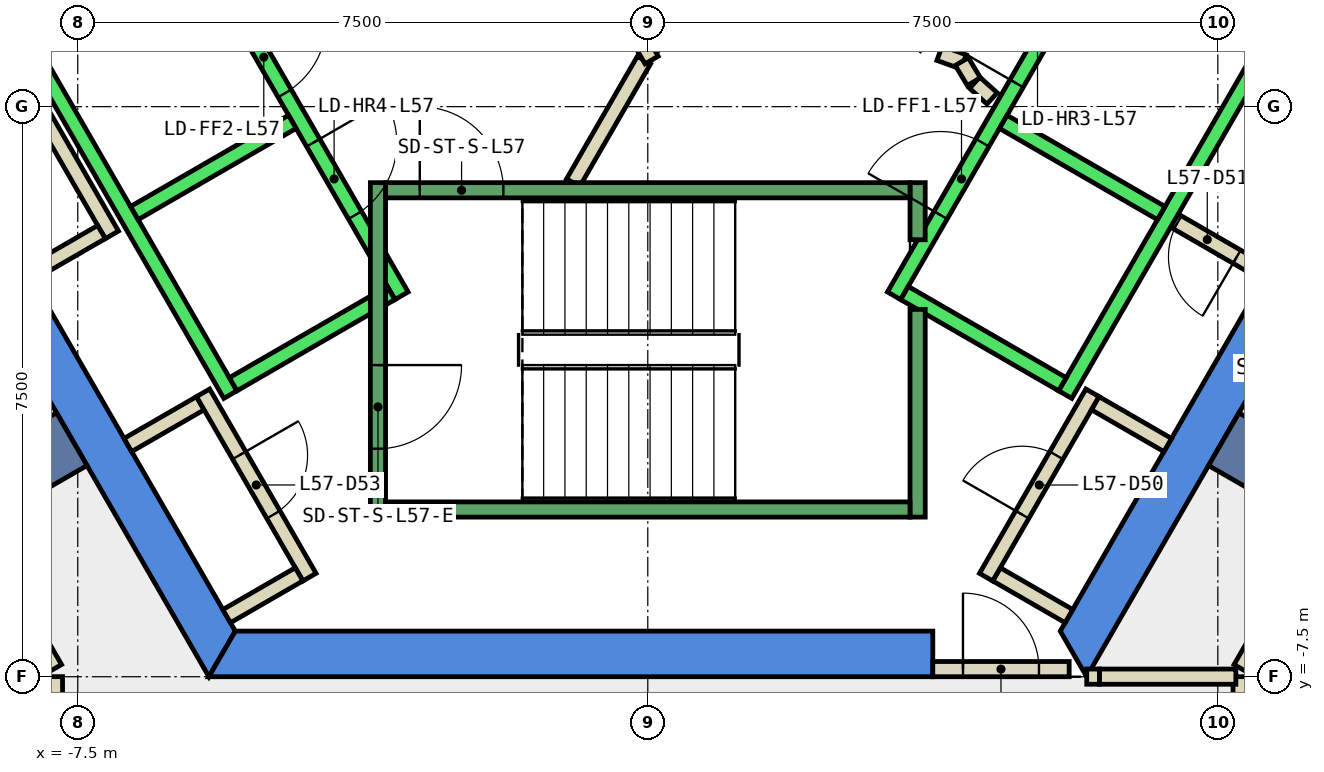
"""IFC4 building model, lengths in metres.
Left out: names, types, materials, properties, quantities, classifications, styles, units other than length and angle.
Written with IfcOpenShell. Run it as: python <this file> out.ifc"""

import sys

from ifc_helpers import new_model, si_unit, direction, frame, frame_2d, origin, place, context, subcontext, project, spatial, polyline, rectangle, outline, extrude, element, fill, save


model = new_model("IFC4")
c1 = context("Model", 3, precision=1e-05, world=origin(), true_north=direction((0.0, 1.0)))
c2 = subcontext(c1, "Body", "Model", "MODEL_VIEW")
j1 = project(units=[si_unit("LENGTHUNIT", "METRE"), si_unit("PLANEANGLEUNIT", "RADIAN")], contexts=[c1])
p1 = place(None, origin())
s1 = spatial("IfcSite", under=j1, at=p1, CompositionType="ELEMENT")
p2 = place(p1, origin())
s2 = spatial("IfcBuilding", under=s1, at=p2, CompositionType="ELEMENT")
p3 = place(p2, frame((0.0, 0.0, 252.2)))
s3 = spatial("IfcBuildingStorey", under=s2, at=p3, CompositionType="ELEMENT", Elevation=252.2)
p4 = place(p3, frame((0.0, 0.0, -0.34)))
e1 = element("IfcWall", 1, at=p4, inside=s3, PredefinedType="SHEAR", context=c2, shape_type="SweptSolid", body=[
    extrude(outline(polyline([(-11.547, 2.5), (-5.774, -7.5), (-5.427, -6.9), (-10.854, 2.5), (-11.547, 2.5)])), origin(), (0.0, 0.0, 1.0), 3.6),
])
p5 = place(p3, frame((0.0, 0.0, -0.34)))
e2 = element("IfcWall", 2, at=p5, inside=s3, PredefinedType="SHEAR", context=c2, shape_type="SweptSolid", body=[
    extrude(outline(polyline([(3.75, -7.5), (3.75, -6.9), (-5.427, -6.9), (-5.774, -7.5), (3.75, -7.5)])), origin(), (0.0, 0.0, 1.0), 3.6),
])
p6 = place(p3, frame((0.0, 0.0, -0.34)))
e3 = element("IfcWall", 3, at=p6, inside=s3, PredefinedType="SHEAR", context=c2, shape_type="SweptSolid", body=[
    extrude(outline(polyline([(5.774, -7.5), (11.547, 2.5), (10.854, 2.5), (5.427, -6.9), (5.774, -7.5)])), origin(), (0.0, 0.0, 1.0), 3.6),
])
for number, where, z_axis, x_axis in (
    (4, (7.578, -4.375, -0.34), (0.0, 0.0, 1.0), (0.866, -0.5, 0.0)),
    (5, (-7.578, -4.375, -0.34), (0.0, 0.0, 1.0), (-0.866, -0.5, 0.0)),
):
    element("IfcWall", number, at=place(p3, frame(where, z_axis=z_axis, x_axis=x_axis)), inside=s3, PredefinedType="SHEAR", context=c2, shape_type="SweptSolid", body=[
        extrude(rectangle(XDim=9.0, YDim=0.8, at=frame_2d((4.5, 0.0))), origin(), (0.0, 0.0, 1.0), 3.6),
    ])
p7 = place(p3, frame((-7.8, -7.39, 0.0), z_axis=(0.0, 0.0, 1.0), x_axis=(-0.500266477503, 0.865871498253, 0.0)))
e6 = element("IfcWall", 6, at=p7, inside=s3, PredefinedType="PARTITIONING", context=c2, shape_type="SweptSolid", body=[
    extrude(rectangle(XDim=1.463, YDim=0.2, at=frame_2d((0.731, 0.0))), origin(), (0.0, 0.0, 1.0), 3.26),
])
p8 = place(p3, frame((5.541, -6.703, 0.0), z_axis=(0.0, 0.0, 1.0), x_axis=(-0.86621513555, 0.499671230855, 0.0)))
e7 = element("IfcWall", 7, at=p8, inside=s3, PredefinedType="PARTITIONING", context=c2, shape_type="SweptSolid", body=[
    extrude(rectangle(XDim=1.1, YDim=0.2, at=frame_2d((0.55, 0.0))), origin(), (0.0, 0.0, 1.0), 3.26),
])
p9 = place(p3, frame((4.451, -6.19, 0.0), z_axis=(0.0, 0.0, 1.0), x_axis=(0.500011755427, 0.866018616679, 0.0)))
e8 = element("IfcWall", 8, at=p9, inside=s3, PredefinedType="PARTITIONING", context=c2, shape_type="SweptSolid", body=[
    extrude(rectangle(XDim=2.8, YDim=0.2, at=frame_2d((1.4, 0.0))), origin(), (0.0, 0.0, 1.0), 3.26),
])
p10 = place(p9, frame((0.95, 0.0, 0.0)))
e9 = element("IfcOpeningElement", 9, at=p10, cuts=e8, PredefinedType="OPENING", context=c2, shape_type="SweptSolid", body=[
    extrude(rectangle(XDim=0.9, YDim=2.1, at=frame_2d((0.45, 1.05))), frame((0.0, 0.11, 0.0), z_axis=(0.0, -1.0, 0.0), x_axis=(1.0, 0.0, 0.0)), (0.0, 0.0, 1.0), 0.22),
])
p11 = place(p3, frame((5.888, -3.902, 0.0), z_axis=(0.0, 0.0, 1.0), x_axis=(0.86621513555, -0.499671230855, 0.0)))
e10 = element("IfcWall", 10, at=p11, inside=s3, PredefinedType="PARTITIONING", context=c2, shape_type="SweptSolid", body=[
    extrude(rectangle(XDim=1.1, YDim=0.2, at=frame_2d((0.55, 0.0))), origin(), (0.0, 0.0, 1.0), 3.26),
])
p12 = place(p3, frame((8.14, -2.2, 0.0), z_axis=(0.0, 0.0, 1.0), x_axis=(-0.865545166185, 0.500830874941, 0.0)))
e11 = element("IfcWall", 11, at=p12, inside=s3, PredefinedType="PARTITIONING", context=c2, shape_type="SweptSolid", body=[
    extrude(rectangle(XDim=1.5, YDim=0.2, at=frame_2d((0.75, 0.0))), origin(), (0.0, 0.0, 1.0), 3.26),
])
p13 = place(p12, frame((0.45, 0.0, 0.0)))
e12 = element("IfcOpeningElement", 12, at=p13, cuts=e11, PredefinedType="OPENING", context=c2, shape_type="SweptSolid", body=[
    extrude(rectangle(XDim=0.9, YDim=2.1, at=frame_2d((0.45, 1.05))), frame((0.0, 0.11, 0.0), z_axis=(0.0, -1.0, 0.0), x_axis=(1.0, 0.0, 0.0)), (0.0, 0.0, 1.0), 0.22),
])
p14 = place(p3, frame((-9.751, 2.99, 0.0), z_axis=(0.0, 0.0, 1.0), x_axis=(0.499955951776, -0.866050833545, 0.0)))
e13 = element("IfcWall", 13, at=p14, inside=s3, PredefinedType="PARTITIONING", context=c2, shape_type="SweptSolid", body=[
    extrude(rectangle(XDim=5.4, YDim=0.2, at=frame_2d((2.7, 0.0))), origin(), (0.0, 0.0, 1.0), 3.26),
])
p15 = place(p3, frame((-7.188, -1.65, 0.0), z_axis=(0.0, 0.0, 1.0), x_axis=(-0.865841558281, -0.500318294642, 0.0)))
e14 = element("IfcWall", 14, at=p15, inside=s3, PredefinedType="PARTITIONING", context=c2, shape_type="SweptSolid", body=[
    extrude(rectangle(XDim=1.099, YDim=0.2, at=frame_2d((0.55, 0.0))), origin(), (0.0, 0.0, 1.0), 3.26),
])
p16 = place(p3, frame((-6.841, -4.452, 0.0), z_axis=(0.0, 0.0, 1.0), x_axis=(0.86621513555, 0.499671230855, 0.0)))
e15 = element("IfcWall", 15, at=p16, inside=s3, PredefinedType="PARTITIONING", context=c2, shape_type="SweptSolid", body=[
    extrude(rectangle(XDim=1.1, YDim=0.2, at=frame_2d((0.55, 0.0))), origin(), (0.0, 0.0, 1.0), 3.26),
])
p17 = place(p3, frame((-5.851, -3.765, 0.0), z_axis=(0.0, 0.0, 1.0), x_axis=(0.500011755427, -0.866018616679, 0.0)))
e16 = element("IfcWall", 16, at=p17, inside=s3, PredefinedType="PARTITIONING", context=c2, shape_type="SweptSolid", body=[
    extrude(rectangle(XDim=2.8, YDim=0.2, at=frame_2d((1.4, 0.0))), origin(), (0.0, 0.0, 1.0), 3.26),
])
p18 = place(p17, frame((0.95, 0.0, 0.0)))
e17 = element("IfcOpeningElement", 17, at=p18, cuts=e16, PredefinedType="OPENING", context=c2, shape_type="SweptSolid", body=[
    extrude(rectangle(XDim=0.9, YDim=2.1, at=frame_2d((0.45, 1.05))), frame((0.0, 0.11, 0.0), z_axis=(0.0, -1.0, 0.0), x_axis=(1.0, 0.0, 0.0)), (0.0, 0.0, 1.0), 0.22),
])
p19 = place(p3, frame((-4.588, -6.153, 0.0), z_axis=(0.0, 0.0, 1.0), x_axis=(-0.86621513555, -0.499671230855, 0.0)))
e18 = element("IfcWall", 18, at=p19, inside=s3, PredefinedType="PARTITIONING", context=c2, shape_type="SweptSolid", body=[
    extrude(rectangle(XDim=1.1, YDim=0.2, at=frame_2d((0.55, 0.0))), origin(), (0.0, 0.0, 1.0), 3.26),
])
p20 = place(p3, frame((5.775, -7.499, 0.0), z_axis=(0.0, 0.0, 1.0), x_axis=(1.0, 0.0, 0.0)))
e19 = element("IfcWall", 19, at=p20, inside=s3, PredefinedType="PARTITIONING", context=c2, shape_type="SweptSolid", body=[
    extrude(rectangle(XDim=0.169, YDim=0.2, at=frame_2d((0.084, 0.0))), origin(), (0.0, 0.0, 1.0), 2.4),
])
p21 = place(p3, frame((7.8, -7.39, 0.0), z_axis=(0.0, 0.0, 1.0), x_axis=(0.499977374825, 0.866038466041, 0.0)))
e20 = element("IfcWall", 20, at=p21, inside=s3, PredefinedType="PARTITIONING", context=c2, shape_type="SweptSolid", body=[
    extrude(rectangle(XDim=2.1, YDim=0.2, at=frame_2d((1.05, 0.0))), origin(), (0.0, 0.0, 1.0), 3.26),
])
p22 = place(p3, frame((-0.982, -1.0, 0.0), z_axis=(0.0, 0.0, 1.0), x_axis=(0.50024047865, 0.865886518847, 0.0)))
e21 = element("IfcWall", 21, at=p22, inside=s3, PredefinedType="PARTITIONING", context=c2, shape_type="SweptSolid", body=[
    extrude(rectangle(XDim=1.863, YDim=0.2, at=frame_2d((0.931, 0.0))), origin(), (0.0, 0.0, 1.0), 3.26),
])
p23 = place(p3, frame((3.838, 0.702, 0.0), z_axis=(0.0, 0.0, 1.0), x_axis=(0.941035081519, -0.338308993895, 0.0)))
e22 = element("IfcWall", 22, at=p23, inside=s3, PredefinedType="PARTITIONING", context=c2, shape_type="SweptSolid", body=[
    extrude(rectangle(XDim=0.337, YDim=0.2, at=frame_2d((0.168, 0.0))), origin(), (0.0, 0.0, 1.0), 3.26),
])
p24 = place(p3, frame((4.132, 0.593, 0.0), z_axis=(0.0, 0.0, 1.0), x_axis=(0.513561617048, -0.858052717201, 0.0)))
e23 = element("IfcWall", 23, at=p24, inside=s3, PredefinedType="PARTITIONING", context=c2, shape_type="SweptSolid", body=[
    extrude(rectangle(XDim=0.308, YDim=0.2, at=frame_2d((0.154, 0.0))), origin(), (0.0, 0.0, 1.0), 3.26),
])
p25 = place(p3, frame((4.301, 0.315, 0.0), z_axis=(0.0, 0.0, 1.0), x_axis=(0.741798017506, -0.670623367639, 0.0)))
e24 = element("IfcWall", 24, at=p25, inside=s3, PredefinedType="PARTITIONING", context=c2, shape_type="SweptSolid", body=[
    extrude(rectangle(XDim=0.309, YDim=0.2, at=frame_2d((0.154, 0.0))), origin(), (0.0, 0.0, 1.0), 3.26),
])
p26 = place(p3, frame((-2.54, 5.1, 0.0), z_axis=(0.0, 0.0, 1.0), x_axis=(0.499925051871, -0.866068670783, 0.0)))
e25 = element("IfcWall", 25, at=p26, inside=s3, PredefinedType="PARTITIONING", context=c2, shape_type="SweptSolid", body=[
    extrude(rectangle(XDim=5.181, YDim=0.2, at=frame_2d((2.59, 0.0))), origin(), (0.0, 0.0, 1.0), 3.26),
])
p27 = place(p26, frame((2.04, 0.0, 0.0)))
e26 = element("IfcOpeningElement", 26, at=p27, cuts=e25, PredefinedType="OPENING", context=c2, shape_type="SweptSolid", body=[
    extrude(rectangle(XDim=1.0, YDim=2.1, at=frame_2d((0.5, 1.05))), frame((0.0, 0.11, 0.0), z_axis=(0.0, -1.0, 0.0), x_axis=(1.0, 0.0, 0.0)), (0.0, 0.0, 1.0), 0.22),
])
p28 = place(p3, frame((7.8, -7.499, 0.0), z_axis=(0.0, 0.0, 1.0), x_axis=(0.0, -1.0, 0.0)))
e27 = element("IfcWall", 27, at=p28, inside=s3, PredefinedType="PARTITIONING", context=c2, shape_type="SweptSolid", body=[
    extrude(rectangle(XDim=4.685, YDim=0.2, at=frame_2d((2.343, 0.0))), origin(), (0.0, 0.0, 1.0), 3.26),
])
p29 = place(p28, frame((1.842, 0.0, 0.0)))
e28 = element("IfcOpeningElement", 28, at=p29, cuts=e27, PredefinedType="OPENING", context=c2, shape_type="SweptSolid", body=[
    extrude(rectangle(XDim=1.0, YDim=2.1, at=frame_2d((0.5, 1.05))), frame((0.0, 0.11, 0.0), z_axis=(0.0, -1.0, 0.0), x_axis=(1.0, 0.0, 0.0)), (0.0, 0.0, 1.0), 0.22),
])
p30 = place(p3, frame((-7.8, -12.184, 0.0), z_axis=(0.0, 0.0, 1.0), x_axis=(0.0, 1.0, 0.0)))
e29 = element("IfcWall", 29, at=p30, inside=s3, PredefinedType="PARTITIONING", context=c2, shape_type="SweptSolid", body=[
    extrude(rectangle(XDim=4.685, YDim=0.2, at=frame_2d((2.343, 0.0))), origin(), (0.0, 0.0, 1.0), 3.26),
])
p31 = place(p3, frame((3.75, -7.4, 0.0), z_axis=(0.0, 0.0, 1.0), x_axis=(1.0, 0.0, 0.0)))
e30 = element("IfcWall", 30, at=p31, inside=s3, PredefinedType="PARTITIONING", context=c2, shape_type="SweptSolid", body=[
    extrude(rectangle(XDim=1.794, YDim=0.2, at=frame_2d((0.897, 0.0))), origin(), (0.0, 0.0, 1.0), 2.4),
])
p32 = place(p31, frame((0.397, 0.0, 0.0)))
e31 = element("IfcOpeningElement", 31, at=p32, cuts=e30, PredefinedType="OPENING", context=c2, shape_type="SweptSolid", body=[
    extrude(rectangle(XDim=1.0, YDim=2.1, at=frame_2d((0.5, 1.05))), frame((0.0, 0.11, 0.0), z_axis=(0.0, -1.0, 0.0), x_axis=(1.0, 0.0, 0.0)), (0.0, 0.0, 1.0), 0.22),
])
p33 = place(p3, frame((5.944, -7.499, 0.0), z_axis=(0.0, 0.0, 1.0), x_axis=(1.0, 0.0, 0.0)))
e32 = element("IfcWall", 32, at=p33, inside=s3, PredefinedType="PARTITIONING", context=c2, shape_type="SweptSolid", body=[
    extrude(rectangle(XDim=1.793, YDim=0.2, at=frame_2d((0.896, 0.0))), origin(), (0.0, 0.0, 1.0), 3.26),
])
p34 = place(p3, frame((-5.94, 2.188, 0.0), z_axis=(0.0, 0.0, 1.0), x_axis=(0.500034260056, -0.866005622828, 0.0)))
e33 = element("IfcWall", 33, at=p34, inside=s3, PredefinedType="STANDARD", context=c2, shape_type="SweptSolid", body=[
    extrude(rectangle(XDim=5.399, YDim=0.2, at=frame_2d((2.7, 0.0))), origin(), (0.0, 0.0, 1.0), 3.26),
])
p35 = place(p34, frame((3.075, 0.0, 0.0)))
e34 = element("IfcOpeningElement", 34, at=p35, cuts=e33, PredefinedType="OPENING", context=c2, shape_type="SweptSolid", body=[
    extrude(rectangle(XDim=1.1, YDim=2.1, at=frame_2d((0.55, 1.05))), frame((0.0, 0.11, 0.0), z_axis=(0.0, -1.0, 0.0), x_axis=(1.0, 0.0, 0.0)), (0.0, 0.0, 1.0), 0.22),
])
p36 = place(p34, frame((1.225, 0.0, 0.0)))
e35 = element("IfcOpeningElement", 35, at=p36, cuts=e33, PredefinedType="OPENING", context=c2, shape_type="SweptSolid", body=[
    extrude(rectangle(XDim=1.1, YDim=2.1, at=frame_2d((0.55, 1.05))), frame((0.0, 0.11, 0.0), z_axis=(0.0, -1.0, 0.0), x_axis=(1.0, 0.0, 0.0)), (0.0, 0.0, 1.0), 0.22),
])
p37 = place(p3, frame((-8.192, 0.888, 0.0), z_axis=(0.0, 0.0, 1.0), x_axis=(0.500034260056, -0.866005622828, 0.0)))
e36 = element("IfcWall", 36, at=p37, inside=s3, PredefinedType="STANDARD", context=c2, shape_type="SweptSolid", body=[
    extrude(rectangle(XDim=5.399, YDim=0.2, at=frame_2d((2.7, 0.0))), origin(), (0.0, 0.0, 1.0), 3.26),
])
p38 = place(p3, frame((-4.677, -0.2, 0.0), z_axis=(0.0, 0.0, 1.0), x_axis=(-0.865973769406, -0.500089422704, 0.0)))
e37 = element("IfcWall", 37, at=p38, inside=s3, PredefinedType="STANDARD", context=c2, shape_type="SweptSolid", body=[
    extrude(rectangle(XDim=2.399, YDim=0.2, at=frame_2d((1.2, 0.0))), origin(), (0.0, 0.0, 1.0), 3.26),
])
p39 = place(p3, frame((-3.377, -2.452, 0.0), z_axis=(0.0, 0.0, 1.0), x_axis=(-0.865955154139, -0.50012165622, 0.0)))
e38 = element("IfcWall", 38, at=p39, inside=s3, PredefinedType="STANDARD", context=c2, shape_type="SweptSolid", body=[
    extrude(rectangle(XDim=2.4, YDim=0.2, at=frame_2d((1.2, 0.0))), origin(), (0.0, 0.0, 1.0), 3.26),
])
p40 = place(p3, frame((3.24, -2.488, 0.0), z_axis=(0.0, 0.0, 1.0), x_axis=(0.500034260056, 0.866005622828, 0.0)))
e39 = element("IfcWall", 39, at=p40, inside=s3, PredefinedType="STANDARD", context=c2, shape_type="SweptSolid", body=[
    extrude(rectangle(XDim=5.399, YDim=0.2, at=frame_2d((2.7, 0.0))), origin(), (0.0, 0.0, 1.0), 3.26),
])
p41 = place(p40, frame((3.225, 0.0, 0.0)))
e40 = element("IfcOpeningElement", 40, at=p41, cuts=e39, PredefinedType="OPENING", context=c2, shape_type="SweptSolid", body=[
    extrude(rectangle(XDim=1.1, YDim=2.1, at=frame_2d((0.55, 1.05))), frame((0.0, 0.11, 0.0), z_axis=(0.0, -1.0, 0.0), x_axis=(1.0, 0.0, 0.0)), (0.0, 0.0, 1.0), 0.22),
])
p42 = place(p40, frame((1.225, 0.0, 0.0)))
e41 = element("IfcOpeningElement", 41, at=p42, cuts=e39, PredefinedType="OPENING", context=c2, shape_type="SweptSolid", body=[
    extrude(rectangle(XDim=1.1, YDim=2.1, at=frame_2d((0.55, 1.05))), frame((0.0, 0.11, 0.0), z_axis=(0.0, -1.0, 0.0), x_axis=(1.0, 0.0, 0.0)), (0.0, 0.0, 1.0), 0.22),
])
p43 = place(p3, frame((5.492, -3.788, 0.0), z_axis=(0.0, 0.0, 1.0), x_axis=(0.500034260056, 0.866005622828, 0.0)))
e42 = element("IfcWall", 42, at=p43, inside=s3, PredefinedType="STANDARD", context=c2, shape_type="SweptSolid", body=[
    extrude(rectangle(XDim=5.399, YDim=0.2, at=frame_2d((2.7, 0.0))), origin(), (0.0, 0.0, 1.0), 3.26),
])
p44 = place(p3, frame((3.377, -2.452, 0.0), z_axis=(0.0, 0.0, 1.0), x_axis=(0.865955154139, -0.50012165622, 0.0)))
e43 = element("IfcWall", 43, at=p44, inside=s3, PredefinedType="STANDARD", context=c2, shape_type="SweptSolid", body=[
    extrude(rectangle(XDim=2.4, YDim=0.2, at=frame_2d((1.2, 0.0))), origin(), (0.0, 0.0, 1.0), 3.26),
])
p45 = place(p3, frame((4.677, -0.2, 0.0), z_axis=(0.0, 0.0, 1.0), x_axis=(0.865973769406, -0.500089422704, 0.0)))
e44 = element("IfcWall", 44, at=p45, inside=s3, PredefinedType="STANDARD", context=c2, shape_type="SweptSolid", body=[
    extrude(rectangle(XDim=2.399, YDim=0.2, at=frame_2d((1.2, 0.0))), origin(), (0.0, 0.0, 1.0), 3.26),
])
p46 = place(p3, frame((-3.55, -1.0, 0.0), z_axis=(0.0, 0.0, 1.0), x_axis=(0.0, -1.0, 0.0)))
e45 = element("IfcWall", 45, at=p46, inside=s3, PredefinedType="STANDARD", context=c2, shape_type="SweptSolid", body=[
    extrude(rectangle(XDim=4.4, YDim=0.2, at=frame_2d((2.2, 0.0))), origin(), (0.0, 0.0, 1.0), 3.26),
])
p47 = place(p46, frame((2.4, 0.0, 0.0)))
e46 = element("IfcOpeningElement", 46, at=p47, cuts=e45, PredefinedType="OPENING", context=c2, shape_type="SweptSolid", body=[
    extrude(rectangle(XDim=1.1, YDim=2.2, at=frame_2d((0.55, 1.1))), frame((0.0, 0.11, 0.0), z_axis=(0.0, -1.0, 0.0), x_axis=(1.0, 0.0, 0.0)), (0.0, 0.0, 1.0), 0.22),
])
p48 = place(p3, frame((3.55, -2.667, 0.0), z_axis=(0.0, 0.0, 1.0), x_axis=(0.0, -1.0, 0.0)))
e47 = element("IfcWall", 47, at=p48, inside=s3, PredefinedType="STANDARD", context=c2, shape_type="SweptSolid", body=[
    extrude(rectangle(XDim=2.733, YDim=0.2, at=frame_2d((1.366, 0.0))), origin(), (0.0, 0.0, 1.0), 3.26),
])
p49 = place(p3, frame((3.55, -1.0, 0.0), z_axis=(0.0, 0.0, 1.0), x_axis=(0.0, -1.0, 0.0)))
e48 = element("IfcWall", 48, at=p49, inside=s3, PredefinedType="STANDARD", context=c2, shape_type="SweptSolid", body=[
    extrude(rectangle(XDim=0.751, YDim=0.2, at=frame_2d((0.375, 0.0))), origin(), (0.0, 0.0, 1.0), 3.26),
])
p50 = place(p3, frame((-3.45, -1.1, 0.0), z_axis=(0.0, 0.0, 1.0), x_axis=(1.0, 0.0, 0.0)))
e49 = element("IfcWall", 49, at=p50, inside=s3, PredefinedType="STANDARD", context=c2, shape_type="SweptSolid", body=[
    extrude(rectangle(XDim=6.9, YDim=0.2, at=frame_2d((3.45, 0.0))), origin(), (0.0, 0.0, 1.0), 3.26),
])
p51 = place(p50, frame((0.45, 0.0, 0.0)))
e50 = element("IfcOpeningElement", 50, at=p51, cuts=e49, PredefinedType="OPENING", context=c2, shape_type="SweptSolid", body=[
    extrude(rectangle(XDim=1.1, YDim=2.2, at=frame_2d((0.55, 1.1))), frame((0.0, 0.11, 0.0), z_axis=(0.0, -1.0, 0.0), x_axis=(1.0, 0.0, 0.0)), (0.0, 0.0, 1.0), 0.22),
])
p52 = place(p3, frame((-3.45, -5.3, 0.0), z_axis=(0.0, 0.0, 1.0), x_axis=(1.0, 0.0, 0.0)))
e51 = element("IfcWall", 51, at=p52, inside=s3, PredefinedType="STANDARD", context=c2, shape_type="SweptSolid", body=[
    extrude(rectangle(XDim=6.9, YDim=0.2, at=frame_2d((3.45, 0.0))), origin(), (0.0, 0.0, 1.0), 3.26),
])
p53 = place(p10, origin())
e52 = element("IfcDoor", 52, at=p53, inside=s3, OperationType="SINGLE_SWING_LEFT", PredefinedType="DOOR", context=c2, shape_type="SweptSolid", body=[
    extrude(rectangle(XDim=0.9, YDim=2.1, at=frame_2d((0.45, 1.05))), frame((0.0, 0.025, 0.0), z_axis=(0.0, -1.0, 0.0), x_axis=(1.0, 0.0, 0.0)), (0.0, 0.0, 1.0), 0.05),
])
fill(e9, e52)
p54 = place(p13, origin())
e53 = element("IfcDoor", 53, at=p54, inside=s3, OperationType="SINGLE_SWING_LEFT", PredefinedType="DOOR", context=c2, shape_type="SweptSolid", body=[
    extrude(rectangle(XDim=0.9, YDim=2.1, at=frame_2d((0.45, 1.05))), frame((0.0, 0.025, 0.0), z_axis=(0.0, -1.0, 0.0), x_axis=(1.0, 0.0, 0.0)), (0.0, 0.0, 1.0), 0.05),
])
fill(e12, e53)
p55 = place(p18, origin())
e54 = element("IfcDoor", 54, at=p55, inside=s3, OperationType="SINGLE_SWING_RIGHT", PredefinedType="DOOR", context=c2, shape_type="SweptSolid", body=[
    extrude(rectangle(XDim=0.9, YDim=2.1, at=frame_2d((0.45, 1.05))), frame((0.0, 0.025, 0.0), z_axis=(0.0, -1.0, 0.0), x_axis=(1.0, 0.0, 0.0)), (0.0, 0.0, 1.0), 0.05),
])
fill(e17, e54)
p56 = place(p32, origin())
e55 = element("IfcDoor", 55, at=p56, inside=s3, OperationType="SINGLE_SWING_LEFT", PredefinedType="DOOR", context=c2, shape_type="SweptSolid", body=[
    extrude(rectangle(XDim=1.0, YDim=2.1, at=frame_2d((0.5, 1.05))), frame((0.0, 0.025, 0.0), z_axis=(0.0, -1.0, 0.0), x_axis=(1.0, 0.0, 0.0)), (0.0, 0.0, 1.0), 0.05),
])
fill(e31, e55)
p57 = place(p41, origin())
e56 = element("IfcDoor", 56, at=p57, inside=s3, OperationType="SLIDING_TO_LEFT", PredefinedType="DOOR", context=c2, shape_type="SweptSolid", body=[
    extrude(rectangle(XDim=1.1, YDim=2.1, at=frame_2d((0.55, 1.05))), frame((0.0, 0.025, 0.0), z_axis=(0.0, -1.0, 0.0), x_axis=(1.0, 0.0, 0.0)), (0.0, 0.0, 1.0), 0.05),
])
fill(e40, e56)
p58 = place(p35, origin())
e57 = element("IfcDoor", 57, at=p58, inside=s3, OperationType="SLIDING_TO_LEFT", PredefinedType="DOOR", context=c2, shape_type="SweptSolid", body=[
    extrude(rectangle(XDim=1.1, YDim=2.1, at=frame_2d((0.55, 1.05))), frame((0.0, 0.025, 0.0), z_axis=(0.0, -1.0, 0.0), x_axis=(1.0, 0.0, 0.0)), (0.0, 0.0, 1.0), 0.05),
])
fill(e34, e57)
p59 = place(p42, origin())
e58 = element("IfcDoor", 58, at=p59, inside=s3, OperationType="SLIDING_TO_LEFT", PredefinedType="DOOR", context=c2, shape_type="SweptSolid", body=[
    extrude(rectangle(XDim=1.1, YDim=2.1, at=frame_2d((0.55, 1.05))), frame((0.0, 0.025, 0.0), z_axis=(0.0, -1.0, 0.0), x_axis=(1.0, 0.0, 0.0)), (0.0, 0.0, 1.0), 0.05),
])
fill(e41, e58)
p60 = place(p36, origin())
e59 = element("IfcDoor", 59, at=p60, inside=s3, OperationType="SLIDING_TO_LEFT", PredefinedType="DOOR", context=c2, shape_type="SweptSolid", body=[
    extrude(rectangle(XDim=1.1, YDim=2.1, at=frame_2d((0.55, 1.05))), frame((0.0, 0.025, 0.0), z_axis=(0.0, -1.0, 0.0), x_axis=(1.0, 0.0, 0.0)), (0.0, 0.0, 1.0), 0.05),
])
fill(e35, e59)
p61 = place(p51, origin())
e60 = element("IfcDoor", 60, at=p61, inside=s3, OperationType="SINGLE_SWING_LEFT", PredefinedType="DOOR", context=c2, shape_type="SweptSolid", body=[
    extrude(rectangle(XDim=1.1, YDim=2.2, at=frame_2d((0.55, 1.1))), frame((0.0, 0.025, 0.0), z_axis=(0.0, -1.0, 0.0), x_axis=(1.0, 0.0, 0.0)), (0.0, 0.0, 1.0), 0.05),
])
fill(e50, e60)
p62 = place(p47, origin())
e61 = element("IfcDoor", 61, at=p62, inside=s3, OperationType="SINGLE_SWING_LEFT", PredefinedType="DOOR", context=c2, shape_type="SweptSolid", body=[
    extrude(rectangle(XDim=1.1, YDim=2.2, at=frame_2d((0.55, 1.1))), frame((0.0, 0.025, 0.0), z_axis=(0.0, -1.0, 0.0), x_axis=(1.0, 0.0, 0.0)), (0.0, 0.0, 1.0), 0.05),
])
fill(e46, e61)
save(model, sys.argv[1])
